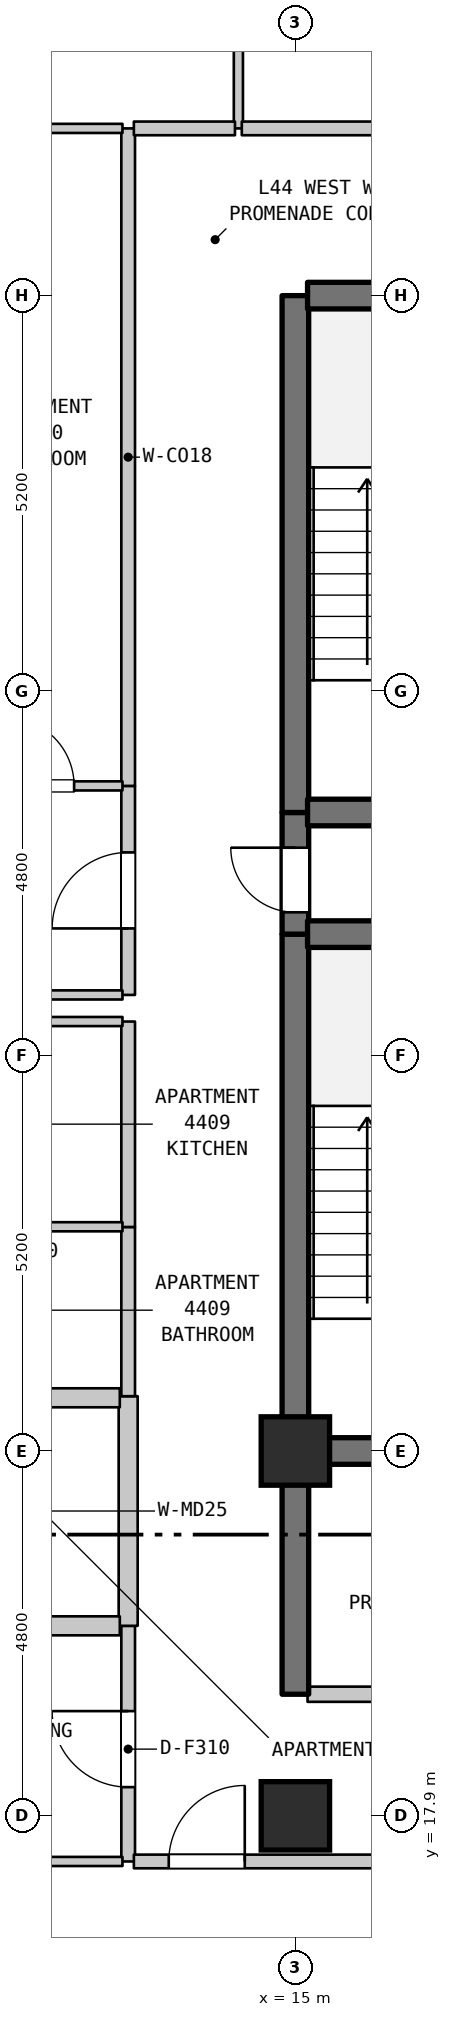
"""IFC4 building model, lengths in metres.
Left out: names, types, materials, properties, quantities, classifications, styles, units other than length and angle.
Written with IfcOpenShell. Run it as: python <this file> out.ifc"""

import sys

from ifc_helpers import new_model, si_unit, direction, frame, frame_2d, origin, origin_2d, place, context, subcontext, project, spatial, rectangle, extrude, element, fill, save


model = new_model("IFC4")
c1 = context("Model", 3, precision=1e-05, world=origin(), true_north=direction((0.0, 1.0)))
c2 = subcontext(c1, "Body", "Model", "MODEL_VIEW")
j1 = project(units=[si_unit("LENGTHUNIT", "METRE"), si_unit("PLANEANGLEUNIT", "RADIAN")], contexts=[c1])
p1 = place(None, origin())
s1 = spatial("IfcSite", under=j1, at=p1, CompositionType="ELEMENT")
p2 = place(p1, origin())
s2 = spatial("IfcBuilding", under=s1, at=p2, CompositionType="ELEMENT")
p3 = place(p2, frame((0.0, 0.0, 180.2)))
s3 = spatial("IfcBuildingStorey", under=s2, at=p3, CompositionType="ELEMENT", Elevation=180.2)
for number, where, z_axis, x_axis in (
    (1, (15.0, 17.9, 0.0), (0.0, 0.0, 1.0), (1.0, 0.0, 0.0)),
    (2, (15.0, 22.7, 0.0), (0.0, 0.0, 1.0), (1.0, 0.0, 0.0)),
):
    element("IfcColumn", number, at=place(p3, frame(where, z_axis=z_axis, x_axis=x_axis)), inside=s3, PredefinedType="COLUMN", context=c2, shape_type="SweptSolid", body=[
        extrude(rectangle(XDim=0.9, YDim=0.9, at=origin_2d()), origin(), (0.0, 0.0, 1.0), 3.7),
    ])
p4 = place(p3, frame((12.8, 17.3, 0.0), z_axis=(0.0, 0.0, 1.0), x_axis=(0.0, 1.0, 0.0)))
e3 = element("IfcWall", 3, at=p4, inside=s3, PredefinedType="STANDARD", context=c2, shape_type="SweptSolid", body=[
    extrude(rectangle(XDim=3.1, YDim=0.18, at=frame_2d((1.55, 0.0))), origin(), (0.0, 0.0, 1.0), 3.38),
])
p5 = place(p4, frame((0.978, 0.0, 0.0)))
e4 = element("IfcOpeningElement", 4, at=p5, cuts=e3, PredefinedType="OPENING", context=c2, shape_type="SweptSolid", body=[
    extrude(rectangle(XDim=1.0, YDim=2.15, at=frame_2d((0.5, 1.075))), frame((0.0, 0.1, 0.0), z_axis=(0.0, -1.0, 0.0), x_axis=(1.0, 0.0, 0.0)), (0.0, 0.0, 1.0), 0.2),
])
p6 = place(p3, frame((12.8, 20.4, 0.0), z_axis=(0.0, 0.0, 1.0), x_axis=(0.0, 1.0, 0.0)))
e5 = element("IfcWall", 5, at=p6, inside=s3, PredefinedType="STANDARD", context=c2, shape_type="SweptSolid", body=[
    extrude(rectangle(XDim=3.021, YDim=0.25, at=frame_2d((1.51, 0.0))), origin(), (0.0, 0.0, 1.0), 3.38),
])
p7 = place(p3, frame((12.8, 23.421, 0.0), z_axis=(0.0, 0.0, 1.0), x_axis=(0.0, 1.0, 0.0)))
e6 = element("IfcWall", 6, at=p7, inside=s3, PredefinedType="STANDARD", context=c2, shape_type="SweptSolid", body=[
    extrude(rectangle(XDim=2.226, YDim=0.18, at=frame_2d((1.113, 0.0))), origin(), (0.0, 0.0, 1.0), 3.38),
])
p8 = place(p3, frame((12.8, 25.647, 0.0), z_axis=(0.0, 0.0, 1.0), x_axis=(0.0, 1.0, 0.0)))
e7 = element("IfcWall", 7, at=p8, inside=s3, PredefinedType="STANDARD", context=c2, shape_type="SweptSolid", body=[
    extrude(rectangle(XDim=2.703, YDim=0.18, at=frame_2d((1.352, 0.0))), origin(), (0.0, 0.0, 1.0), 3.38),
])
p9 = place(p3, frame((12.8, 28.7, 0.0), z_axis=(0.0, 0.0, 1.0), x_axis=(0.0, 1.0, 0.0)))
e8 = element("IfcWall", 8, at=p9, inside=s3, PredefinedType="STANDARD", context=c2, shape_type="SweptSolid", body=[
    extrude(rectangle(XDim=2.75, YDim=0.18, at=frame_2d((1.375, 0.0))), origin(), (0.0, 0.0, 1.0), 3.38),
])
p10 = place(p9, frame((0.875, 0.0, 0.0)))
e9 = element("IfcOpeningElement", 9, at=p10, cuts=e8, PredefinedType="OPENING", context=c2, shape_type="SweptSolid", body=[
    extrude(rectangle(XDim=1.0, YDim=2.15, at=frame_2d((0.5, 1.075))), frame((0.0, 0.1, 0.0), z_axis=(0.0, -1.0, 0.0), x_axis=(1.0, 0.0, 0.0)), (0.0, 0.0, 1.0), 0.2),
])
p11 = place(p3, frame((12.8, 31.45, 0.0), z_axis=(0.0, 0.0, 1.0), x_axis=(0.0, 1.0, 0.0)))
e10 = element("IfcWall", 10, at=p11, inside=s3, PredefinedType="STANDARD", context=c2, shape_type="SweptSolid", body=[
    extrude(rectangle(XDim=8.65, YDim=0.18, at=frame_2d((4.325, 0.0))), origin(), (0.0, 0.0, 1.0), 3.38),
])
p12 = place(p3, frame((14.25, 40.1, 0.0), z_axis=(0.0, 0.0, 1.0), x_axis=(0.0, 1.0, 0.0)))
e11 = element("IfcWall", 11, at=p12, inside=s3, PredefinedType="PARTITIONING", context=c2, shape_type="SweptSolid", body=[
    extrude(rectangle(XDim=3.2, YDim=0.12, at=frame_2d((1.6, 0.0))), origin(), (0.0, 0.0, 1.0), 3.38),
])
p13 = place(p12, frame((1.15, 0.0, 0.0)))
e12 = element("IfcOpeningElement", 12, at=p13, cuts=e11, PredefinedType="OPENING", context=c2, shape_type="SweptSolid", body=[
    extrude(rectangle(XDim=0.9, YDim=2.15, at=frame_2d((0.45, 1.075))), frame((0.0, 0.07, 0.0), z_axis=(0.0, -1.0, 0.0), x_axis=(1.0, 0.0, 0.0)), (0.0, 0.0, 1.0), 0.14),
])
p14 = place(p3, frame((15.0, 19.5, 0.0), z_axis=(0.0, 0.0, 1.0), x_axis=(0.0, 1.0, 0.0)))
e13 = element("IfcWall", 13, at=p14, inside=s3, PredefinedType="SHEAR", context=c2, shape_type="SweptSolid", body=[
    extrude(rectangle(XDim=3.2, YDim=0.35, at=frame_2d((1.6, 0.0))), origin(), (0.0, 0.0, 1.0), 3.38),
])
p15 = place(p3, frame((15.0, 22.7, 0.0), z_axis=(0.0, 0.0, 1.0), x_axis=(0.0, 1.0, 0.0)))
e14 = element("IfcWall", 14, at=p15, inside=s3, PredefinedType="SHEAR", context=c2, shape_type="SweptSolid", body=[
    extrude(rectangle(XDim=6.8, YDim=0.35, at=frame_2d((3.4, 0.0))), origin(), (0.0, 0.0, 1.0), 3.38),
])
p16 = place(p3, frame((15.0, 29.5, 0.0), z_axis=(0.0, 0.0, 1.0), x_axis=(0.0, 1.0, 0.0)))
e15 = element("IfcWall", 15, at=p16, inside=s3, PredefinedType="SHEAR", context=c2, shape_type="SweptSolid", body=[
    extrude(rectangle(XDim=1.6, YDim=0.35, at=frame_2d((0.8, 0.0))), origin(), (0.0, 0.0, 1.0), 3.38),
])
p17 = place(p16, frame((0.287, 0.0, 0.0)))
e16 = element("IfcOpeningElement", 16, at=p17, cuts=e15, PredefinedType="OPENING", context=c2, shape_type="SweptSolid", body=[
    extrude(rectangle(XDim=0.85, YDim=2.1, at=frame_2d((0.425, 1.05))), frame((0.0, 0.185, 0.0), z_axis=(0.0, -1.0, 0.0), x_axis=(1.0, 0.0, 0.0)), (0.0, 0.0, 1.0), 0.37),
])
p18 = place(p3, frame((15.0, 31.1, 0.0), z_axis=(0.0, 0.0, 1.0), x_axis=(0.0, 1.0, 0.0)))
e17 = element("IfcWall", 17, at=p18, inside=s3, PredefinedType="SHEAR", context=c2, shape_type="SweptSolid", body=[
    extrude(rectangle(XDim=6.8, YDim=0.35, at=frame_2d((3.4, 0.0))), origin(), (0.0, 0.0, 1.0), 3.38),
])
p19 = place(p3, frame((9.085, 17.3, 0.0), z_axis=(0.0, 0.0, 1.0), x_axis=(1.0, 0.0, 0.0)))
e18 = element("IfcWall", 18, at=p19, inside=s3, PredefinedType="PARTITIONING", context=c2, shape_type="SweptSolid", body=[
    extrude(rectangle(XDim=3.64, YDim=0.12, at=frame_2d((1.82, 0.0))), origin(), (0.0, 0.0, 1.0), 3.38),
])
p20 = place(p3, frame((12.875, 17.3, 0.0), z_axis=(0.0, 0.0, 1.0), x_axis=(1.0, 0.0, 0.0)))
e19 = element("IfcWall", 19, at=p20, inside=s3, PredefinedType="STANDARD", context=c2, shape_type="SweptSolid", body=[
    extrude(rectangle(XDim=3.5, YDim=0.18, at=frame_2d((1.75, 0.0))), origin(), (0.0, 0.0, 1.0), 3.38),
])
p21 = place(p20, frame((0.459, 0.0, 0.0)))
e20 = element("IfcOpeningElement", 20, at=p21, cuts=e19, PredefinedType="OPENING", context=c2, shape_type="SweptSolid", body=[
    extrude(rectangle(XDim=1.0, YDim=2.15, at=frame_2d((0.5, 1.075))), frame((0.0, 0.1, 0.0), z_axis=(0.0, -1.0, 0.0), x_axis=(1.0, 0.0, 0.0)), (0.0, 0.0, 1.0), 0.2),
])
p22 = place(p3, frame((15.16, 19.5, 0.0), z_axis=(0.0, 0.0, 1.0), x_axis=(1.0, 0.0, 0.0)))
e21 = element("IfcWall", 21, at=p22, inside=s3, PredefinedType="STANDARD", context=c2, shape_type="SweptSolid", body=[
    extrude(rectangle(XDim=3.68, YDim=0.2, at=frame_2d((1.84, 0.0))), origin(), (0.0, 0.0, 1.0), 3.38),
])
p23 = place(p22, frame((1.39, 0.0, 0.0)))
e22 = element("IfcOpeningElement", 22, at=p23, cuts=e21, PredefinedType="OPENING", context=c2, shape_type="SweptSolid", body=[
    extrude(rectangle(XDim=0.9, YDim=2.15, at=frame_2d((0.45, 1.075))), frame((0.0, 0.11, 0.0), z_axis=(0.0, -1.0, 0.0), x_axis=(1.0, 0.0, 0.0)), (0.0, 0.0, 1.0), 0.22),
])
p24 = place(p3, frame((10.66, 20.4, 0.0), z_axis=(0.0, 0.0, 1.0), x_axis=(1.0, 0.0, 0.0)))
e23 = element("IfcWall", 23, at=p24, inside=s3, PredefinedType="STANDARD", context=c2, shape_type="SweptSolid", body=[
    extrude(rectangle(XDim=2.03, YDim=0.25, at=frame_2d((1.015, 0.0))), origin(), (0.0, 0.0, 1.0), 3.38),
])
p25 = place(p3, frame((15.16, 22.7, 0.0), z_axis=(0.0, 0.0, 1.0), x_axis=(1.0, 0.0, 0.0)))
e24 = element("IfcWall", 24, at=p25, inside=s3, PredefinedType="SHEAR", context=c2, shape_type="SweptSolid", body=[
    extrude(rectangle(XDim=3.68, YDim=0.35, at=frame_2d((1.84, 0.0))), origin(), (0.0, 0.0, 1.0), 3.38),
])
p26 = place(p3, frame((10.66, 23.4, 0.0), z_axis=(0.0, 0.0, 1.0), x_axis=(1.0, 0.0, 0.0)))
e25 = element("IfcWall", 25, at=p26, inside=s3, PredefinedType="STANDARD", context=c2, shape_type="SweptSolid", body=[
    extrude(rectangle(XDim=2.03, YDim=0.25, at=frame_2d((1.015, 0.0))), origin(), (0.0, 0.0, 1.0), 3.38),
])
for number, where, z_axis, x_axis in (
    (26, (10.595, 25.65, 0.0), (0.0, 0.0, 1.0), (1.0, 0.0, 0.0)),
    (27, (10.595, 28.35, 0.0), (0.0, 0.0, 1.0), (1.0, 0.0, 0.0)),
):
    element("IfcWall", number, at=place(p3, frame(where, z_axis=z_axis, x_axis=x_axis)), inside=s3, PredefinedType="PARTITIONING", context=c2, shape_type="SweptSolid", body=[
        extrude(rectangle(XDim=2.13, YDim=0.12, at=frame_2d((1.065, 0.0))), origin(), (0.0, 0.0, 1.0), 3.38),
    ])
p27 = place(p3, frame((9.03, 28.7, 0.0), z_axis=(0.0, 0.0, 1.0), x_axis=(1.0, 0.0, 0.0)))
e28 = element("IfcWall", 28, at=p27, inside=s3, PredefinedType="PARTITIONING", context=c2, shape_type="SweptSolid", body=[
    extrude(rectangle(XDim=3.695, YDim=0.12, at=frame_2d((1.848, 0.0))), origin(), (0.0, 0.0, 1.0), 3.38),
])
for number, where, z_axis, x_axis in (
    (29, (15.16, 29.5, 0.0), (0.0, 0.0, 1.0), (1.0, 0.0, 0.0)),
    (30, (15.16, 31.1, 0.0), (0.0, 0.0, 1.0), (1.0, 0.0, 0.0)),
):
    element("IfcWall", number, at=place(p3, frame(where, z_axis=z_axis, x_axis=x_axis)), inside=s3, PredefinedType="SHEAR", context=c2, shape_type="SweptSolid", body=[
        extrude(rectangle(XDim=3.68, YDim=0.35, at=frame_2d((1.84, 0.0))), origin(), (0.0, 0.0, 1.0), 3.38),
    ])
p28 = place(p3, frame((10.523, 31.45, 0.0), z_axis=(0.0, 0.0, 1.0), x_axis=(1.0, 0.0, 0.0)))
e31 = element("IfcWall", 31, at=p28, inside=s3, PredefinedType="PARTITIONING", context=c2, shape_type="SweptSolid", body=[
    extrude(rectangle(XDim=2.202, YDim=0.12, at=frame_2d((1.101, 0.0))), origin(), (0.0, 0.0, 1.0), 3.38),
])
p29 = place(p28, frame((0.666, 0.0, 0.0)))
e32 = element("IfcOpeningElement", 32, at=p29, cuts=e31, PredefinedType="OPENING", context=c2, shape_type="SweptSolid", body=[
    extrude(rectangle(XDim=0.9, YDim=2.1, at=frame_2d((0.45, 1.05))), frame((0.0, 0.07, 0.0), z_axis=(0.0, -1.0, 0.0), x_axis=(1.0, 0.0, 0.0)), (0.0, 0.0, 1.0), 0.14),
])
p30 = place(p3, frame((15.16, 37.9, 0.0), z_axis=(0.0, 0.0, 1.0), x_axis=(1.0, 0.0, 0.0)))
e33 = element("IfcWall", 33, at=p30, inside=s3, PredefinedType="SHEAR", context=c2, shape_type="SweptSolid", body=[
    extrude(rectangle(XDim=3.68, YDim=0.35, at=frame_2d((1.84, 0.0))), origin(), (0.0, 0.0, 1.0), 3.38),
])
p31 = place(p3, frame((10.523, 40.1, 0.0), z_axis=(0.0, 0.0, 1.0), x_axis=(1.0, 0.0, 0.0)))
e34 = element("IfcWall", 34, at=p31, inside=s3, PredefinedType="PARTITIONING", context=c2, shape_type="SweptSolid", body=[
    extrude(rectangle(XDim=2.202, YDim=0.12, at=frame_2d((1.101, 0.0))), origin(), (0.0, 0.0, 1.0), 3.38),
])
p32 = place(p3, frame((12.875, 40.1, 0.0), z_axis=(0.0, 0.0, 1.0), x_axis=(1.0, 0.0, 0.0)))
e35 = element("IfcWall", 35, at=p32, inside=s3, PredefinedType="STANDARD", context=c2, shape_type="SweptSolid", body=[
    extrude(rectangle(XDim=1.33, YDim=0.18, at=frame_2d((0.665, 0.0))), origin(), (0.0, 0.0, 1.0), 3.38),
])
p33 = place(p3, frame((14.295, 40.1, 0.0), z_axis=(0.0, 0.0, 1.0), x_axis=(1.0, 0.0, 0.0)))
e36 = element("IfcWall", 36, at=p33, inside=s3, PredefinedType="STANDARD", context=c2, shape_type="SweptSolid", body=[
    extrude(rectangle(XDim=2.26, YDim=0.18, at=frame_2d((1.13, 0.0))), origin(), (0.0, 0.0, 1.0), 3.38),
])
p34 = place(p5, origin())
e37 = element("IfcDoor", 37, at=p34, inside=s3, OperationType="SINGLE_SWING_RIGHT", PredefinedType="DOOR", context=c2, shape_type="SweptSolid", body=[
    extrude(rectangle(XDim=1.0, YDim=2.15, at=frame_2d((0.5, 1.075))), frame((0.0, 0.025, 0.0), z_axis=(0.0, -1.0, 0.0), x_axis=(1.0, 0.0, 0.0)), (0.0, 0.0, 1.0), 0.05),
])
fill(e4, e37)
p35 = place(p10, origin())
e38 = element("IfcDoor", 38, at=p35, inside=s3, OperationType="SINGLE_SWING_LEFT", PredefinedType="DOOR", context=c2, shape_type="SweptSolid", body=[
    extrude(rectangle(XDim=1.0, YDim=2.15, at=frame_2d((0.5, 1.075))), frame((0.0, 0.025, 0.0), z_axis=(0.0, -1.0, 0.0), x_axis=(1.0, 0.0, 0.0)), (0.0, 0.0, 1.0), 0.05),
])
fill(e9, e38)
p36 = place(p17, origin())
e39 = element("IfcDoor", 39, at=p36, inside=s3, OperationType="SINGLE_SWING_RIGHT", PredefinedType="DOOR", context=c2, shape_type="SweptSolid", body=[
    extrude(rectangle(XDim=0.85, YDim=2.1, at=frame_2d((0.425, 1.05))), frame((0.0, 0.025, 0.0), z_axis=(0.0, -1.0, 0.0), x_axis=(1.0, 0.0, 0.0)), (0.0, 0.0, 1.0), 0.05),
])
fill(e16, e39)
p37 = place(p21, origin())
e40 = element("IfcDoor", 40, at=p37, inside=s3, OperationType="SINGLE_SWING_RIGHT", PredefinedType="DOOR", context=c2, shape_type="SweptSolid", body=[
    extrude(rectangle(XDim=1.0, YDim=2.15, at=frame_2d((0.5, 1.075))), frame((0.0, 0.025, 0.0), z_axis=(0.0, -1.0, 0.0), x_axis=(1.0, 0.0, 0.0)), (0.0, 0.0, 1.0), 0.05),
])
fill(e20, e40)
p38 = place(p29, origin())
e41 = element("IfcDoor", 41, at=p38, inside=s3, OperationType="SINGLE_SWING_LEFT", PredefinedType="DOOR", context=c2, shape_type="SweptSolid", body=[
    extrude(rectangle(XDim=0.9, YDim=2.1, at=frame_2d((0.45, 1.05))), frame((0.0, 0.025, 0.0), z_axis=(0.0, -1.0, 0.0), x_axis=(1.0, 0.0, 0.0)), (0.0, 0.0, 1.0), 0.05),
])
fill(e32, e41)
save(model, sys.argv[1])
